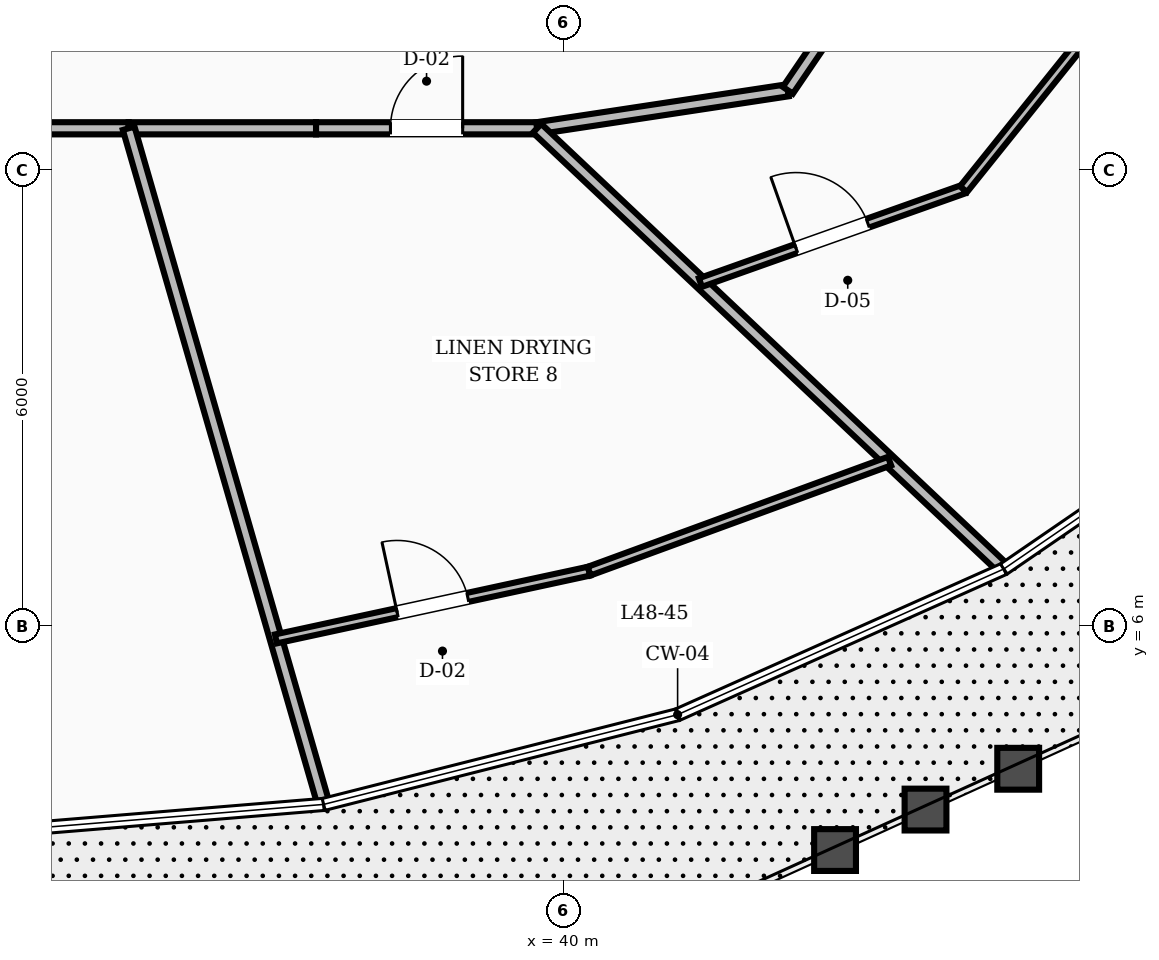
"""IFC4 building model, lengths in metres.
Left out: names, types, materials, properties, quantities, classifications, styles, units other than length and angle.
Written with IfcOpenShell. Run it as: python <this file> out.ifc"""

import sys

from ifc_helpers import new_model, si_unit, direction, frame, frame_2d, origin, place, context, subcontext, project, spatial, rectangle, extrude, element, fill, save


model = new_model("IFC4")
c1 = context("Model", 3, precision=1e-05, world=origin(), true_north=direction((0.0, 1.0)))
c2 = subcontext(c1, "Body", "Model", "MODEL_VIEW")
j1 = project(units=[si_unit("LENGTHUNIT", "METRE"), si_unit("PLANEANGLEUNIT", "RADIAN")], contexts=[c1])
p1 = place(None, origin())
s1 = spatial("IfcSite", under=j1, at=p1, CompositionType="ELEMENT")
p2 = place(p1, origin())
s2 = spatial("IfcBuilding", under=s1, at=p2, CompositionType="ELEMENT")
p3 = place(p2, frame((0.0, 0.0, 185.6)))
s3 = spatial("IfcBuildingStorey", under=s2, at=p3, CompositionType="ELEMENT", Elevation=185.6)
p4 = place(p3, frame((32.0, 12.55, 0.0), z_axis=(0.0, 0.0, 1.0), x_axis=(1.0, 0.0, 0.0)))
e1 = element("IfcWall", 1, at=p4, inside=s3, PredefinedType="SOLIDWALL", context=c2, shape_type="SweptSolid", body=[
    extrude(rectangle(XDim=2.278, YDim=0.16, at=frame_2d((1.139, 0.0))), origin(), (0.0, 0.0, 1.0), 2.8),
])
p5 = place(p3, frame((34.278, 12.55, 0.0), z_axis=(0.0, 0.0, 1.0), x_axis=(1.0, 0.0, 0.0)))
e2 = element("IfcWall", 2, at=p5, inside=s3, PredefinedType="SOLIDWALL", context=c2, shape_type="SweptSolid", body=[
    extrude(rectangle(XDim=2.465, YDim=0.16, at=frame_2d((1.232, 0.0))), origin(), (0.0, 0.0, 1.0), 2.8),
])
p6 = place(p3, frame((36.743, 12.55, 0.0), z_axis=(0.0, 0.0, 1.0), x_axis=(1.0, 0.0, 0.0)))
e3 = element("IfcWall", 3, at=p6, inside=s3, PredefinedType="SOLIDWALL", context=c2, shape_type="SweptSolid", body=[
    extrude(rectangle(XDim=2.908, YDim=0.16, at=frame_2d((1.454, 0.0))), origin(), (0.0, 0.0, 1.0), 2.8),
])
p7 = place(p6, frame((0.979, 0.0, 0.0)))
e4 = element("IfcOpeningElement", 4, at=p7, cuts=e3, PredefinedType="OPENING", context=c2, shape_type="SweptSolid", body=[
    extrude(rectangle(XDim=0.95, YDim=2.1, at=frame_2d((0.475, 1.05))), frame((0.0, 0.09, 0.0), z_axis=(0.0, -1.0, 0.0), x_axis=(1.0, 0.0, 0.0)), (0.0, 0.0, 1.0), 0.18),
])
p8 = place(p3, frame((39.651, 12.55, 0.0), z_axis=(0.0, 0.0, 1.0), x_axis=(0.988710906508, 0.149835721217, 0.0)))
e5 = element("IfcWall", 5, at=p8, inside=s3, PredefinedType="SOLIDWALL", context=c2, shape_type="SweptSolid", body=[
    extrude(rectangle(XDim=3.337, YDim=0.16, at=frame_2d((1.668, 0.0))), origin(), (0.0, 0.0, 1.0), 2.8),
])
p9 = place(p3, frame((42.95, 13.05, 0.0), z_axis=(0.0, 0.0, 1.0), x_axis=(0.562674669208, 0.826678423955, 0.0)))
e6 = element("IfcWall", 6, at=p9, inside=s3, PredefinedType="SOLIDWALL", context=c2, shape_type="SweptSolid", body=[
    extrude(rectangle(XDim=3.021, YDim=0.16, at=frame_2d((1.511, 0.0))), origin(), (0.0, 0.0, 1.0), 2.8),
])
p10 = place(p3, frame((39.651, 12.55, 0.0), z_axis=(0.0, 0.0, 1.0), x_axis=(0.727100249426, -0.686531301024, 0.0)))
e7 = element("IfcWall", 7, at=p10, inside=s3, PredefinedType="SOLIDWALL", context=c2, shape_type="SweptSolid", body=[
    extrude(rectangle(XDim=8.395, YDim=0.16, at=frame_2d((4.198, 0.0))), origin(), (0.0, 0.0, 1.0), 2.8),
])
p11 = place(p3, frame((41.8, 10.521, 0.0), z_axis=(0.0, 0.0, 1.0), x_axis=(0.942439233955, 0.334377466798, 0.0)))
e8 = element("IfcWall", 8, at=p11, inside=s3, PredefinedType="PARTITIONING", context=c2, shape_type="SweptSolid", body=[
    extrude(rectangle(XDim=3.673, YDim=0.12, at=frame_2d((1.836, 0.0))), origin(), (0.0, 0.0, 1.0), 2.8),
])
p12 = place(p11, frame((1.336, 0.0, 0.0)))
e9 = element("IfcOpeningElement", 9, at=p12, cuts=e8, PredefinedType="OPENING", context=c2, shape_type="SweptSolid", body=[
    extrude(rectangle(XDim=1.0, YDim=2.1, at=frame_2d((0.5, 1.05))), frame((0.0, 0.07, 0.0), z_axis=(0.0, -1.0, 0.0), x_axis=(1.0, 0.0, 0.0)), (0.0, 0.0, 1.0), 0.14),
])
p13 = place(p3, frame((45.261, 11.749, 0.0), z_axis=(0.0, 0.0, 1.0), x_axis=(0.625853878004, 0.779940333223, 0.0)))
e10 = element("IfcWall", 10, at=p13, inside=s3, PredefinedType="PARTITIONING", context=c2, shape_type="SweptSolid", body=[
    extrude(rectangle(XDim=3.492, YDim=0.12, at=frame_2d((1.746, 0.0))), origin(), (0.0, 0.0, 1.0), 2.8),
])
p14 = place(p3, frame((34.278, 12.55, 0.0), z_axis=(0.0, 0.0, 1.0), x_axis=(0.277080625879, -0.960846671828, 0.0)))
e11 = element("IfcWall", 11, at=p14, inside=s3, PredefinedType="SOLIDWALL", context=c2, shape_type="SweptSolid", body=[
    extrude(rectangle(XDim=9.208, YDim=0.16, at=frame_2d((4.604, 0.0))), origin(), (0.0, 0.0, 1.0), 2.8),
])
p15 = place(p3, frame((36.215, 5.833, 0.0), z_axis=(0.0, 0.0, 1.0), x_axis=(0.977391204778, 0.211438957673, 0.0)))
e12 = element("IfcWall", 12, at=p15, inside=s3, PredefinedType="PARTITIONING", context=c2, shape_type="SweptSolid", body=[
    extrude(rectangle(XDim=4.216, YDim=0.12, at=frame_2d((2.108, 0.0))), origin(), (0.0, 0.0, 1.0), 2.8),
])
p16 = place(p15, frame((1.633, 0.0, 0.0)))
e13 = element("IfcOpeningElement", 13, at=p16, cuts=e12, PredefinedType="OPENING", context=c2, shape_type="SweptSolid", body=[
    extrude(rectangle(XDim=0.95, YDim=2.1, at=frame_2d((0.475, 1.05))), frame((0.0, 0.07, 0.0), z_axis=(0.0, -1.0, 0.0), x_axis=(1.0, 0.0, 0.0)), (0.0, 0.0, 1.0), 0.14),
])
p17 = place(p3, frame((40.335, 6.724, 0.0), z_axis=(0.0, 0.0, 1.0), x_axis=(0.939020571254, 0.343860970105, 0.0)))
e14 = element("IfcWall", 14, at=p17, inside=s3, PredefinedType="PARTITIONING", context=c2, shape_type="SweptSolid", body=[
    extrude(rectangle(XDim=4.209, YDim=0.12, at=frame_2d((2.105, 0.0))), origin(), (0.0, 0.0, 1.0), 2.8),
])
p18 = place(p12, origin())
e15 = element("IfcDoor", 15, at=p18, inside=s3, OperationType="SINGLE_SWING_LEFT", PredefinedType="DOOR", context=c2, shape_type="SweptSolid", body=[
    extrude(rectangle(XDim=1.0, YDim=2.1, at=frame_2d((0.5, 1.05))), frame((0.0, 0.025, 0.0), z_axis=(0.0, -1.0, 0.0), x_axis=(1.0, 0.0, 0.0)), (0.0, 0.0, 1.0), 0.05),
])
fill(e9, e15)
p19 = place(p7, origin())
e16 = element("IfcDoor", 16, at=p19, inside=s3, OperationType="SINGLE_SWING_RIGHT", PredefinedType="DOOR", context=c2, shape_type="SweptSolid", body=[
    extrude(rectangle(XDim=0.95, YDim=2.1, at=frame_2d((0.475, 1.05))), frame((0.0, 0.025, 0.0), z_axis=(0.0, -1.0, 0.0), x_axis=(1.0, 0.0, 0.0)), (0.0, 0.0, 1.0), 0.05),
])
fill(e4, e16)
p20 = place(p16, origin())
e17 = element("IfcDoor", 17, at=p20, inside=s3, OperationType="SINGLE_SWING_LEFT", PredefinedType="DOOR", context=c2, shape_type="SweptSolid", body=[
    extrude(rectangle(XDim=0.95, YDim=2.1, at=frame_2d((0.475, 1.05))), frame((0.0, 0.025, 0.0), z_axis=(0.0, -1.0, 0.0), x_axis=(1.0, 0.0, 0.0)), (0.0, 0.0, 1.0), 0.05),
])
fill(e13, e17)
save(model, sys.argv[1])
